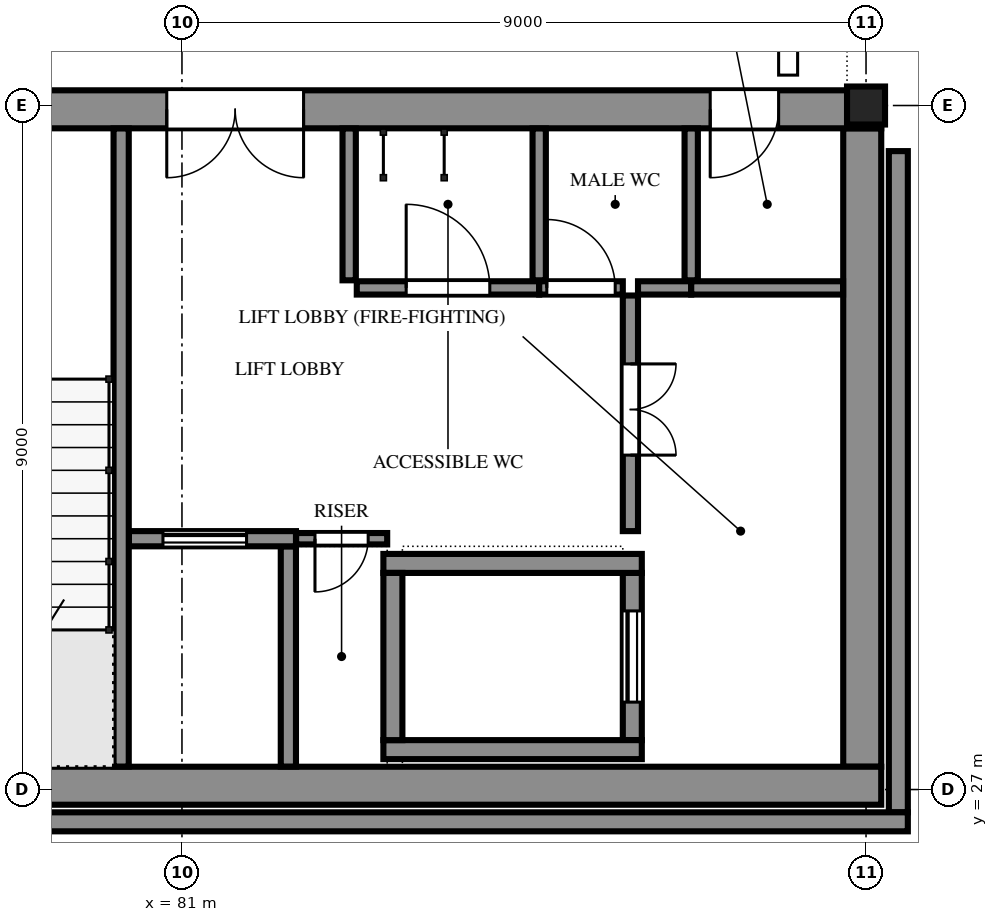
"""IFC4 building model, lengths in metres.
Left out: names, types, materials, properties, quantities, classifications, styles, units other than length and angle.
Written with IfcOpenShell. Run it as: python <this file> out.ifc"""

import sys

from ifc_helpers import new_model, si_unit, direction, frame, frame_2d, origin, origin_2d, place, context, subcontext, project, spatial, polyline, rectangle, hollow_rectangle, outline, extrude, element, fill, save


model = new_model("IFC4")
c1 = context("Model", 3, precision=1e-05, world=origin(), true_north=direction((0.0, 1.0)))
c2 = subcontext(c1, "Body", "Model", "MODEL_VIEW")
j1 = project(units=[si_unit("LENGTHUNIT", "METRE"), si_unit("PLANEANGLEUNIT", "RADIAN")], contexts=[c1])
p1 = place(None, origin())
s1 = spatial("IfcSite", under=j1, at=p1, CompositionType="ELEMENT")
p2 = place(p1, origin())
s2 = spatial("IfcBuilding", under=s1, at=p2, CompositionType="ELEMENT")
p3 = place(p2, frame((0.0, 0.0, 15.9)))
s3 = spatial("IfcBuildingStorey", under=s2, at=p3, CompositionType="ELEMENT", Elevation=15.9)
p4 = place(p3, frame((90.0, 36.0, 0.0), z_axis=(0.0, 0.0, 1.0), x_axis=(1.0, 0.0, 0.0)))
e1 = element("IfcColumn", 1, at=p4, inside=s3, PredefinedType="COLUMN", context=c2, shape_type="SweptSolid", body=[
    extrude(hollow_rectangle(XDim=0.5, YDim=0.5, WallThickness=0.032, at=origin_2d()), origin(), (0.0, 0.0, 1.0), 4.2),
])
p5 = place(p3, frame((71.8, 27.05, 0.0), z_axis=(0.0, 0.0, 1.0), x_axis=(1.0, 0.0, 0.0)))
e2 = element("IfcWall", 2, at=p5, inside=s3, PredefinedType="SOLIDWALL", context=c2, shape_type="SweptSolid", body=[
    extrude(rectangle(XDim=18.4, YDim=0.5, at=frame_2d((9.2, 0.0))), origin(), (0.0, 0.0, 1.0), 4.2),
])
p6 = place(p3, frame((71.8, 35.95, 0.0), z_axis=(0.0, 0.0, 1.0), x_axis=(1.0, 0.0, 0.0)))
e3 = element("IfcWall", 3, at=p6, inside=s3, PredefinedType="SOLIDWALL", context=c2, shape_type="SweptSolid", body=[
    extrude(rectangle(XDim=18.4, YDim=0.5, at=frame_2d((9.2, 0.0))), origin(), (0.0, 0.0, 1.0), 4.2),
])
p7 = place(p6, frame((1.5, 0.0, 0.0)))
e4 = element("IfcOpeningElement", 4, at=p7, cuts=e3, PredefinedType="OPENING", context=c2, shape_type="SweptSolid", body=[
    extrude(rectangle(XDim=1.8, YDim=2.1, at=frame_2d((0.9, 1.05))), frame((0.0, 0.26, 0.0), z_axis=(0.0, -1.0, 0.0), x_axis=(1.0, 0.0, 0.0)), (0.0, 0.0, 1.0), 0.52),
])
p8 = place(p6, frame((5.5, 0.0, 0.0)))
e5 = element("IfcOpeningElement", 5, at=p8, cuts=e3, PredefinedType="OPENING", context=c2, shape_type="SweptSolid", body=[
    extrude(rectangle(XDim=1.8, YDim=2.1, at=frame_2d((0.9, 1.05))), frame((0.0, 0.26, 0.0), z_axis=(0.0, -1.0, 0.0), x_axis=(1.0, 0.0, 0.0)), (0.0, 0.0, 1.0), 0.52),
])
p9 = place(p6, frame((9.0, 0.0, 0.0)))
e6 = element("IfcOpeningElement", 6, at=p9, cuts=e3, PredefinedType="OPENING", context=c2, shape_type="SweptSolid", body=[
    extrude(rectangle(XDim=1.8, YDim=2.1, at=frame_2d((0.9, 1.05))), frame((0.0, 0.26, 0.0), z_axis=(0.0, -1.0, 0.0), x_axis=(1.0, 0.0, 0.0)), (0.0, 0.0, 1.0), 0.52),
])
p10 = place(p6, frame((16.15, 0.0, 0.0)))
e7 = element("IfcOpeningElement", 7, at=p10, cuts=e3, PredefinedType="OPENING", context=c2, shape_type="SweptSolid", body=[
    extrude(rectangle(XDim=0.9, YDim=2.1, at=frame_2d((0.45, 1.05))), frame((0.0, 0.26, 0.0), z_axis=(0.0, -1.0, 0.0), x_axis=(1.0, 0.0, 0.0)), (0.0, 0.0, 1.0), 0.52),
])
p11 = place(p3, frame((89.95, 27.3, 0.0), z_axis=(0.0, 0.0, 1.0), x_axis=(0.0, 1.0, 0.0)))
e8 = element("IfcWall", 8, at=p11, inside=s3, PredefinedType="SOLIDWALL", context=c2, shape_type="SweptSolid", body=[
    extrude(rectangle(XDim=8.4, YDim=0.5, at=frame_2d((4.2, 0.0))), origin(), (0.0, 0.0, 1.0), 4.2),
])
p12 = place(p3, frame((80.2, 27.302, -0.15), z_axis=(0.0, 0.0, 1.0), x_axis=(0.0, 1.0, 0.0)))
e9 = element("IfcWall", 9, at=p12, inside=s3, PredefinedType="SOLIDWALL", context=c2, shape_type="SweptSolid", body=[
    extrude(rectangle(XDim=8.396, YDim=0.2, at=frame_2d((4.198, 0.0))), origin(), (0.0, 0.0, 1.0), 3.666),
])
p13 = place(p3, frame((80.302, 30.3, 0.0), z_axis=(0.0, 0.0, 1.0), x_axis=(1.0, 0.0, 0.0)))
e10 = element("IfcWall", 10, at=p13, inside=s3, PredefinedType="SOLIDWALL", context=c2, shape_type="SweptSolid", body=[
    extrude(rectangle(XDim=2.198, YDim=0.2, at=frame_2d((1.099, 0.0))), origin(), (0.0, 0.0, 1.0), 3.516),
])
p14 = place(p13, frame((0.448, 0.0, 0.0)))
e11 = element("IfcOpeningElement", 11, at=p14, cuts=e10, PredefinedType="OPENING", context=c2, shape_type="SweptSolid", body=[
    extrude(rectangle(XDim=1.1, YDim=2.1, at=frame_2d((0.55, 1.05))), frame((0.0, 0.11, 0.0), z_axis=(0.0, -1.0, 0.0), x_axis=(1.0, 0.0, 0.0)), (0.0, 0.0, 1.0), 0.22),
])
p15 = place(p3, frame((82.4, 27.302, 0.0), z_axis=(0.0, 0.0, 1.0), x_axis=(0.0, 1.0, 0.0)))
e12 = element("IfcWall", 12, at=p15, inside=s3, PredefinedType="SOLIDWALL", context=c2, shape_type="SweptSolid", body=[
    extrude(rectangle(XDim=2.898, YDim=0.2, at=frame_2d((1.449, 0.0))), origin(), (0.0, 0.0, 1.0), 3.516),
])
for number, where, z_axis, x_axis in (
    (13, (83.65, 27.525, 0.0), (0.0, 0.0, 1.0), (1.0, 0.0, 0.0)),
    (14, (83.65, 29.975, 0.0), (0.0, 0.0, 1.0), (1.0, 0.0, 0.0)),
):
    element("IfcWall", number, at=place(p3, frame(where, z_axis=z_axis, x_axis=x_axis)), inside=s3, PredefinedType="SOLIDWALL", context=c2, shape_type="SweptSolid", body=[
        extrude(rectangle(XDim=3.4, YDim=0.25, at=frame_2d((1.7, 0.0))), origin(), (0.0, 0.0, 1.0), 3.516),
    ])
p16 = place(p3, frame((83.775, 27.65, 0.0), z_axis=(0.0, 0.0, 1.0), x_axis=(0.0, 1.0, 0.0)))
e15 = element("IfcWall", 15, at=p16, inside=s3, PredefinedType="SOLIDWALL", context=c2, shape_type="SweptSolid", body=[
    extrude(rectangle(XDim=2.2, YDim=0.25, at=frame_2d((1.1, 0.0))), origin(), (0.0, 0.0, 1.0), 3.516),
])
p17 = place(p3, frame((86.925, 27.65, 0.0), z_axis=(0.0, 0.0, 1.0), x_axis=(0.0, 1.0, 0.0)))
e16 = element("IfcWall", 16, at=p17, inside=s3, PredefinedType="SOLIDWALL", context=c2, shape_type="SweptSolid", body=[
    extrude(rectangle(XDim=2.2, YDim=0.25, at=frame_2d((1.1, 0.0))), origin(), (0.0, 0.0, 1.0), 3.516),
])
p18 = place(p17, frame((0.5, 0.0, 0.0)))
e17 = element("IfcOpeningElement", 17, at=p18, cuts=e16, PredefinedType="OPENING", context=c2, shape_type="SweptSolid", body=[
    extrude(rectangle(XDim=1.2, YDim=2.1, at=frame_2d((0.6, 1.05))), frame((0.0, 0.135, 0.0), z_axis=(0.0, -1.0, 0.0), x_axis=(1.0, 0.0, 0.0)), (0.0, 0.0, 1.0), 0.27),
])
p19 = place(p3, frame((83.7, 30.3, 0.0), z_axis=(0.0, 0.0, 1.0), x_axis=(-1.0, 0.0, 0.0)))
e18 = element("IfcWall", 18, at=p19, inside=s3, PredefinedType="SOLIDWALL", context=c2, shape_type="SweptSolid", body=[
    extrude(rectangle(XDim=1.198, YDim=0.15, at=frame_2d((0.599, 0.0))), origin(), (0.0, 0.0, 1.0), 3.516),
])
p20 = place(p19, frame((0.25, 0.0, 0.0)))
e19 = element("IfcOpeningElement", 19, at=p20, cuts=e18, PredefinedType="OPENING", context=c2, shape_type="SweptSolid", body=[
    extrude(rectangle(XDim=0.7, YDim=2.0, at=frame_2d((0.35, 1.0))), frame((0.0, 0.085, 0.0), z_axis=(0.0, -1.0, 0.0), x_axis=(1.0, 0.0, 0.0)), (0.0, 0.0, 1.0), 0.17),
])
p21 = place(p3, frame((86.9, 33.5, 0.0), z_axis=(0.0, 0.0, 1.0), x_axis=(0.0, -1.0, 0.0)))
e20 = element("IfcWall", 20, at=p21, inside=s3, PredefinedType="PARTITIONING", context=c2, shape_type="SweptSolid", body=[
    extrude(rectangle(XDim=3.1, YDim=0.2, at=frame_2d((1.55, 0.0))), origin(), (0.0, 0.0, 1.0), 3.382),
])
p22 = place(p21, frame((0.9, 0.0, 0.0)))
e21 = element("IfcOpeningElement", 21, at=p22, cuts=e20, PredefinedType="OPENING", context=c2, shape_type="SweptSolid", body=[
    extrude(rectangle(XDim=1.2, YDim=2.1, at=frame_2d((0.6, 1.05))), frame((0.0, 0.11, 0.0), z_axis=(0.0, -1.0, 0.0), x_axis=(1.0, 0.0, 0.0)), (0.0, 0.0, 1.0), 0.22),
])
p23 = place(p3, frame((83.2, 35.698, 0.0), z_axis=(0.0, 0.0, 1.0), x_axis=(0.0, -1.0, 0.0)))
e22 = element("IfcWall", 22, at=p23, inside=s3, PredefinedType="PARTITIONING", context=c2, shape_type="SweptSolid", body=[
    extrude(rectangle(XDim=1.998, YDim=0.175, at=frame_2d((0.999, 0.0))), origin(), (0.0, 0.0, 1.0), 3.307),
])
p24 = place(p3, frame((83.3, 33.6, 0.0), z_axis=(0.0, 0.0, 1.0), x_axis=(1.0, 0.0, 0.0)))
e23 = element("IfcWall", 23, at=p24, inside=s3, PredefinedType="PARTITIONING", context=c2, shape_type="SweptSolid", body=[
    extrude(rectangle(XDim=2.4, YDim=0.175, at=frame_2d((1.2, 0.0))), origin(), (0.0, 0.0, 1.0), 3.307),
])
p25 = place(p24, frame((0.65, 0.0, 0.0)))
e24 = element("IfcOpeningElement", 24, at=p25, cuts=e23, PredefinedType="OPENING", context=c2, shape_type="SweptSolid", body=[
    extrude(rectangle(XDim=1.1, YDim=2.1, at=frame_2d((0.55, 1.05))), frame((0.0, 0.097, 0.0), z_axis=(0.0, -1.0, 0.0), x_axis=(1.0, 0.0, 0.0)), (0.0, 0.0, 1.0), 0.195),
])
p26 = place(p3, frame((85.7, 33.6, 0.0), z_axis=(0.0, 0.0, 1.0), x_axis=(1.0, 0.0, 0.0)))
e25 = element("IfcWall", 25, at=p26, inside=s3, PredefinedType="PARTITIONING", context=c2, shape_type="SweptSolid", body=[
    extrude(rectangle(XDim=1.1, YDim=0.175, at=frame_2d((0.55, 0.0))), origin(), (0.0, 0.0, 1.0), 3.307),
])
p27 = place(p26, frame((0.1, 0.0, 0.0)))
e26 = element("IfcOpeningElement", 26, at=p27, cuts=e25, PredefinedType="OPENING", context=c2, shape_type="SweptSolid", body=[
    extrude(rectangle(XDim=0.9, YDim=2.1, at=frame_2d((0.45, 1.05))), frame((0.0, 0.097, 0.0), z_axis=(0.0, -1.0, 0.0), x_axis=(1.0, 0.0, 0.0)), (0.0, 0.0, 1.0), 0.195),
])
p28 = place(p3, frame((87.0, 33.6, 0.0), z_axis=(0.0, 0.0, 1.0), x_axis=(1.0, 0.0, 0.0)))
e27 = element("IfcWall", 27, at=p28, inside=s3, PredefinedType="PARTITIONING", context=c2, shape_type="SweptSolid", body=[
    extrude(rectangle(XDim=0.7, YDim=0.175, at=frame_2d((0.35, 0.0))), origin(), (0.0, 0.0, 1.0), 3.307),
])
for number, where, z_axis, x_axis in (
    (28, (87.7, 33.6, 0.0), (0.0, 0.0, 1.0), (1.0, 0.0, 0.0)),
    (29, (85.7, 35.698, 0.0), (0.0, 0.0, 1.0), (0.0, -1.0, 0.0)),
    (30, (87.7, 35.698, 0.0), (0.0, 0.0, 1.0), (0.0, -1.0, 0.0)),
):
    element("IfcWall", number, at=place(p3, frame(where, z_axis=z_axis, x_axis=x_axis)), inside=s3, PredefinedType="PARTITIONING", context=c2, shape_type="SweptSolid", body=[
        extrude(rectangle(XDim=1.998, YDim=0.175, at=frame_2d((0.999, 0.0))), origin(), (0.0, 0.0, 1.0), 3.307),
    ])
p29 = place(p14, origin())
e31 = element("IfcDoor", 31, at=p29, inside=s3, OperationType="SLIDING_TO_LEFT", PredefinedType="DOOR", context=c2, shape_type="SweptSolid", body=[
    extrude(outline(polyline([(0.0, 0.0), (0.07, 0.0), (0.07, 2.03), (1.03, 2.03), (1.03, 0.0), (1.1, 0.0), (1.1, 2.1), (0.0, 2.1), (0.0, 0.0)])), frame((0.0, 0.025, 0.0), z_axis=(0.0, -1.0, 0.0), x_axis=(1.0, 0.0, 0.0)), (0.0, 0.0, 1.0), 0.05),
    extrude(rectangle(XDim=0.524, YDim=2.016, at=frame_2d((0.336, 1.018))), frame((0.0, 0.018, 0.0), z_axis=(0.0, -1.0, 0.0), x_axis=(1.0, 0.0, 0.0)), (0.0, 0.0, 1.0), 0.016),
    extrude(rectangle(XDim=0.52, YDim=2.016, at=frame_2d((0.766, 1.018))), frame((0.0, -0.002, 0.0), z_axis=(0.0, -1.0, 0.0), x_axis=(1.0, 0.0, 0.0)), (0.0, 0.0, 1.0), 0.016),
])
fill(e11, e31)
p30 = place(p18, origin())
e32 = element("IfcDoor", 32, at=p30, inside=s3, OperationType="SLIDING_TO_LEFT", PredefinedType="DOOR", context=c2, shape_type="SweptSolid", body=[
    extrude(outline(polyline([(0.0, 0.0), (0.07, 0.0), (0.07, 2.03), (1.13, 2.03), (1.13, 0.0), (1.2, 0.0), (1.2, 2.1), (0.0, 2.1), (0.0, 0.0)])), frame((0.0, 0.025, 0.0), z_axis=(0.0, -1.0, 0.0), x_axis=(1.0, 0.0, 0.0)), (0.0, 0.0, 1.0), 0.05),
    extrude(rectangle(XDim=0.579, YDim=2.016, at=frame_2d((0.363, 1.018))), frame((0.0, 0.018, 0.0), z_axis=(0.0, -1.0, 0.0), x_axis=(1.0, 0.0, 0.0)), (0.0, 0.0, 1.0), 0.016),
    extrude(rectangle(XDim=0.575, YDim=2.016, at=frame_2d((0.839, 1.018))), frame((0.0, -0.002, 0.0), z_axis=(0.0, -1.0, 0.0), x_axis=(1.0, 0.0, 0.0)), (0.0, 0.0, 1.0), 0.016),
])
fill(e17, e32)
p31 = place(p9, frame((1.8, 0.0, 0.0), z_axis=(0.0, 0.0, 1.0), x_axis=(-1.0, 0.0, 0.0)))
e33 = element("IfcDoor", 33, at=p31, inside=s3, OperationType="DOUBLE_DOOR_SINGLE_SWING", PredefinedType="DOOR", context=c2, shape_type="SweptSolid", body=[
    extrude(outline(polyline([(0.0, 0.0), (0.07, 0.0), (0.07, 2.03), (1.73, 2.03), (1.73, 0.0), (1.8, 0.0), (1.8, 2.1), (0.0, 2.1), (0.0, 0.0)])), frame((0.0, 0.025, 0.0), z_axis=(0.0, -1.0, 0.0), x_axis=(1.0, 0.0, 0.0)), (0.0, 0.0, 1.0), 0.05),
    extrude(outline(polyline([(0.074, 0.01), (0.897, 0.01), (0.897, 2.026), (0.074, 2.026), (0.074, 0.01)]), holes=[polyline([(0.194, 0.16), (0.777, 0.16), (0.777, 1.01), (0.194, 1.01), (0.194, 0.16)]), polyline([(0.335, 1.16), (0.635, 1.16), (0.635, 1.76), (0.335, 1.76), (0.335, 1.16)])]), frame((0.0, 0.017, 0.0), z_axis=(0.0, -1.0, 0.0), x_axis=(1.0, 0.0, 0.0)), (0.0, 0.0, 1.0), 0.035),
    extrude(rectangle(XDim=0.583, YDim=0.85, at=frame_2d((0.485, 0.585))), frame((0.0, 0.009, 0.0), z_axis=(0.0, -1.0, 0.0), x_axis=(1.0, 0.0, 0.0)), (0.0, 0.0, 1.0), 0.017),
    extrude(rectangle(XDim=0.3, YDim=0.6, at=frame_2d((0.485, 1.46))), frame((0.0, 0.006, 0.0), z_axis=(0.0, -1.0, 0.0), x_axis=(1.0, 0.0, 0.0)), (0.0, 0.0, 1.0), 0.012),
    extrude(outline(polyline([(0.903, 0.01), (1.726, 0.01), (1.726, 2.026), (0.903, 2.026), (0.903, 0.01)]), holes=[polyline([(1.023, 0.16), (1.606, 0.16), (1.606, 1.01), (1.023, 1.01), (1.023, 0.16)]), polyline([(1.165, 1.16), (1.465, 1.16), (1.465, 1.76), (1.165, 1.76), (1.165, 1.16)])]), frame((0.0, 0.017, 0.0), z_axis=(0.0, -1.0, 0.0), x_axis=(1.0, 0.0, 0.0)), (0.0, 0.0, 1.0), 0.035),
    extrude(rectangle(XDim=0.583, YDim=0.85, at=frame_2d((1.314, 0.585))), frame((0.0, 0.009, 0.0), z_axis=(0.0, -1.0, 0.0), x_axis=(1.0, 0.0, 0.0)), (0.0, 0.0, 1.0), 0.017),
    extrude(rectangle(XDim=0.3, YDim=0.6, at=frame_2d((1.314, 1.46))), frame((0.0, 0.006, 0.0), z_axis=(0.0, -1.0, 0.0), x_axis=(1.0, 0.0, 0.0)), (0.0, 0.0, 1.0), 0.012),
])
fill(e6, e33)
p32 = place(p22, origin())
e34 = element("IfcDoor", 34, at=p32, inside=s3, OperationType="DOUBLE_DOOR_SINGLE_SWING", PredefinedType="DOOR", context=c2, shape_type="SweptSolid", body=[
    extrude(outline(polyline([(0.0, 0.0), (0.07, 0.0), (0.07, 2.03), (1.13, 2.03), (1.13, 0.0), (1.2, 0.0), (1.2, 2.1), (0.0, 2.1), (0.0, 0.0)])), frame((0.0, 0.025, 0.0), z_axis=(0.0, -1.0, 0.0), x_axis=(1.0, 0.0, 0.0)), (0.0, 0.0, 1.0), 0.05),
    extrude(outline(polyline([(0.074, 0.01), (0.597, 0.01), (0.597, 2.026), (0.074, 2.026), (0.074, 0.01)]), holes=[polyline([(0.178, 0.373), (0.492, 0.373), (0.492, 1.784), (0.178, 1.784), (0.178, 0.373)])]), frame((0.0, 0.017, 0.0), z_axis=(0.0, -1.0, 0.0), x_axis=(1.0, 0.0, 0.0)), (0.0, 0.0, 1.0), 0.035),
    extrude(rectangle(XDim=0.314, YDim=1.411, at=frame_2d((0.335, 1.079))), frame((0.0, 0.009, 0.0), z_axis=(0.0, -1.0, 0.0), x_axis=(1.0, 0.0, 0.0)), (0.0, 0.0, 1.0), 0.017),
    extrude(outline(polyline([(0.603, 0.01), (1.126, 0.01), (1.126, 2.026), (0.603, 2.026), (0.603, 0.01)]), holes=[polyline([(0.708, 0.373), (1.021, 0.373), (1.021, 1.784), (0.708, 1.784), (0.708, 0.373)])]), frame((0.0, 0.017, 0.0), z_axis=(0.0, -1.0, 0.0), x_axis=(1.0, 0.0, 0.0)), (0.0, 0.0, 1.0), 0.035),
    extrude(rectangle(XDim=0.314, YDim=1.411, at=frame_2d((0.865, 1.079))), frame((0.0, 0.009, 0.0), z_axis=(0.0, -1.0, 0.0), x_axis=(1.0, 0.0, 0.0)), (0.0, 0.0, 1.0), 0.017),
])
fill(e21, e34)
p33 = place(p20, origin())
e35 = element("IfcDoor", 35, at=p33, inside=s3, OperationType="SINGLE_SWING_RIGHT", PredefinedType="DOOR", context=c2, shape_type="SweptSolid", body=[
    extrude(outline(polyline([(0.0, 0.0), (0.07, 0.0), (0.07, 1.93), (0.63, 1.93), (0.63, 0.0), (0.7, 0.0), (0.7, 2.0), (0.0, 2.0), (0.0, 0.0)])), frame((0.0, 0.025, 0.0), z_axis=(0.0, -1.0, 0.0), x_axis=(1.0, 0.0, 0.0)), (0.0, 0.0, 1.0), 0.05),
    extrude(outline(polyline([(0.074, 0.01), (0.626, 0.01), (0.626, 1.926), (0.074, 1.926), (0.074, 0.01)]), holes=[polyline([(0.184, 0.16), (0.516, 0.16), (0.516, 1.01), (0.184, 1.01), (0.184, 0.16)]), polyline([(0.2, 1.16), (0.5, 1.16), (0.5, 1.76), (0.2, 1.76), (0.2, 1.16)])]), frame((0.0, 0.017, 0.0), z_axis=(0.0, -1.0, 0.0), x_axis=(1.0, 0.0, 0.0)), (0.0, 0.0, 1.0), 0.035),
    extrude(rectangle(XDim=0.331, YDim=0.85, at=frame_2d((0.35, 0.585))), frame((0.0, 0.009, 0.0), z_axis=(0.0, -1.0, 0.0), x_axis=(1.0, 0.0, 0.0)), (0.0, 0.0, 1.0), 0.017),
    extrude(rectangle(XDim=0.3, YDim=0.6, at=frame_2d((0.35, 1.46))), frame((0.0, 0.006, 0.0), z_axis=(0.0, -1.0, 0.0), x_axis=(1.0, 0.0, 0.0)), (0.0, 0.0, 1.0), 0.012),
])
fill(e19, e35)
p34 = place(p25, origin())
e36 = element("IfcDoor", 36, at=p34, inside=s3, OperationType="SINGLE_SWING_LEFT", PredefinedType="DOOR", context=c2, shape_type="SweptSolid", body=[
    extrude(outline(polyline([(0.0, 0.0), (0.07, 0.0), (0.07, 2.03), (1.03, 2.03), (1.03, 0.0), (1.1, 0.0), (1.1, 2.1), (0.0, 2.1), (0.0, 0.0)])), frame((0.0, 0.025, 0.0), z_axis=(0.0, -1.0, 0.0), x_axis=(1.0, 0.0, 0.0)), (0.0, 0.0, 1.0), 0.05),
    extrude(outline(polyline([(0.074, 0.01), (1.026, 0.01), (1.026, 2.026), (0.074, 2.026), (0.074, 0.01)]), holes=[polyline([(0.194, 0.16), (0.906, 0.16), (0.906, 1.01), (0.194, 1.01), (0.194, 0.16)]), polyline([(0.4, 1.16), (0.7, 1.16), (0.7, 1.76), (0.4, 1.76), (0.4, 1.16)])]), frame((0.0, 0.017, 0.0), z_axis=(0.0, -1.0, 0.0), x_axis=(1.0, 0.0, 0.0)), (0.0, 0.0, 1.0), 0.035),
    extrude(rectangle(XDim=0.712, YDim=0.85, at=frame_2d((0.55, 0.585))), frame((0.0, 0.009, 0.0), z_axis=(0.0, -1.0, 0.0), x_axis=(1.0, 0.0, 0.0)), (0.0, 0.0, 1.0), 0.017),
    extrude(rectangle(XDim=0.3, YDim=0.6, at=frame_2d((0.55, 1.46))), frame((0.0, 0.006, 0.0), z_axis=(0.0, -1.0, 0.0), x_axis=(1.0, 0.0, 0.0)), (0.0, 0.0, 1.0), 0.012),
])
fill(e24, e36)
p35 = place(p27, origin())
e37 = element("IfcDoor", 37, at=p35, inside=s3, OperationType="SINGLE_SWING_LEFT", PredefinedType="DOOR", context=c2, shape_type="SweptSolid", body=[
    extrude(outline(polyline([(0.0, 0.0), (0.07, 0.0), (0.07, 2.03), (0.83, 2.03), (0.83, 0.0), (0.9, 0.0), (0.9, 2.1), (0.0, 2.1), (0.0, 0.0)])), frame((0.0, 0.025, 0.0), z_axis=(0.0, -1.0, 0.0), x_axis=(1.0, 0.0, 0.0)), (0.0, 0.0, 1.0), 0.05),
    extrude(outline(polyline([(0.074, 0.01), (0.826, 0.01), (0.826, 2.026), (0.074, 2.026), (0.074, 0.01)]), holes=[polyline([(0.194, 0.16), (0.706, 0.16), (0.706, 1.01), (0.194, 1.01), (0.194, 0.16)]), polyline([(0.3, 1.16), (0.6, 1.16), (0.6, 1.76), (0.3, 1.76), (0.3, 1.16)])]), frame((0.0, 0.017, 0.0), z_axis=(0.0, -1.0, 0.0), x_axis=(1.0, 0.0, 0.0)), (0.0, 0.0, 1.0), 0.035),
    extrude(rectangle(XDim=0.512, YDim=0.85, at=frame_2d((0.45, 0.585))), frame((0.0, 0.009, 0.0), z_axis=(0.0, -1.0, 0.0), x_axis=(1.0, 0.0, 0.0)), (0.0, 0.0, 1.0), 0.017),
    extrude(rectangle(XDim=0.3, YDim=0.6, at=frame_2d((0.45, 1.46))), frame((0.0, 0.006, 0.0), z_axis=(0.0, -1.0, 0.0), x_axis=(1.0, 0.0, 0.0)), (0.0, 0.0, 1.0), 0.012),
])
fill(e26, e37)
p36 = place(p10, frame((0.9, 0.0, 0.0), z_axis=(0.0, 0.0, 1.0), x_axis=(-1.0, 0.0, 0.0)))
e38 = element("IfcDoor", 38, at=p36, inside=s3, OperationType="SINGLE_SWING_RIGHT", PredefinedType="DOOR", context=c2, shape_type="SweptSolid", body=[
    extrude(outline(polyline([(0.0, 0.0), (0.07, 0.0), (0.07, 2.03), (0.83, 2.03), (0.83, 0.0), (0.9, 0.0), (0.9, 2.1), (0.0, 2.1), (0.0, 0.0)])), frame((0.0, 0.025, 0.0), z_axis=(0.0, -1.0, 0.0), x_axis=(1.0, 0.0, 0.0)), (0.0, 0.0, 1.0), 0.05),
    extrude(outline(polyline([(0.074, 0.01), (0.826, 0.01), (0.826, 2.026), (0.074, 2.026), (0.074, 0.01)]), holes=[polyline([(0.194, 0.16), (0.706, 0.16), (0.706, 1.01), (0.194, 1.01), (0.194, 0.16)]), polyline([(0.3, 1.16), (0.6, 1.16), (0.6, 1.76), (0.3, 1.76), (0.3, 1.16)])]), frame((0.0, 0.017, 0.0), z_axis=(0.0, -1.0, 0.0), x_axis=(1.0, 0.0, 0.0)), (0.0, 0.0, 1.0), 0.035),
    extrude(rectangle(XDim=0.512, YDim=0.85, at=frame_2d((0.45, 0.585))), frame((0.0, 0.009, 0.0), z_axis=(0.0, -1.0, 0.0), x_axis=(1.0, 0.0, 0.0)), (0.0, 0.0, 1.0), 0.017),
    extrude(rectangle(XDim=0.3, YDim=0.6, at=frame_2d((0.45, 1.46))), frame((0.0, 0.006, 0.0), z_axis=(0.0, -1.0, 0.0), x_axis=(1.0, 0.0, 0.0)), (0.0, 0.0, 1.0), 0.012),
])
fill(e7, e38)
save(model, sys.argv[1])
